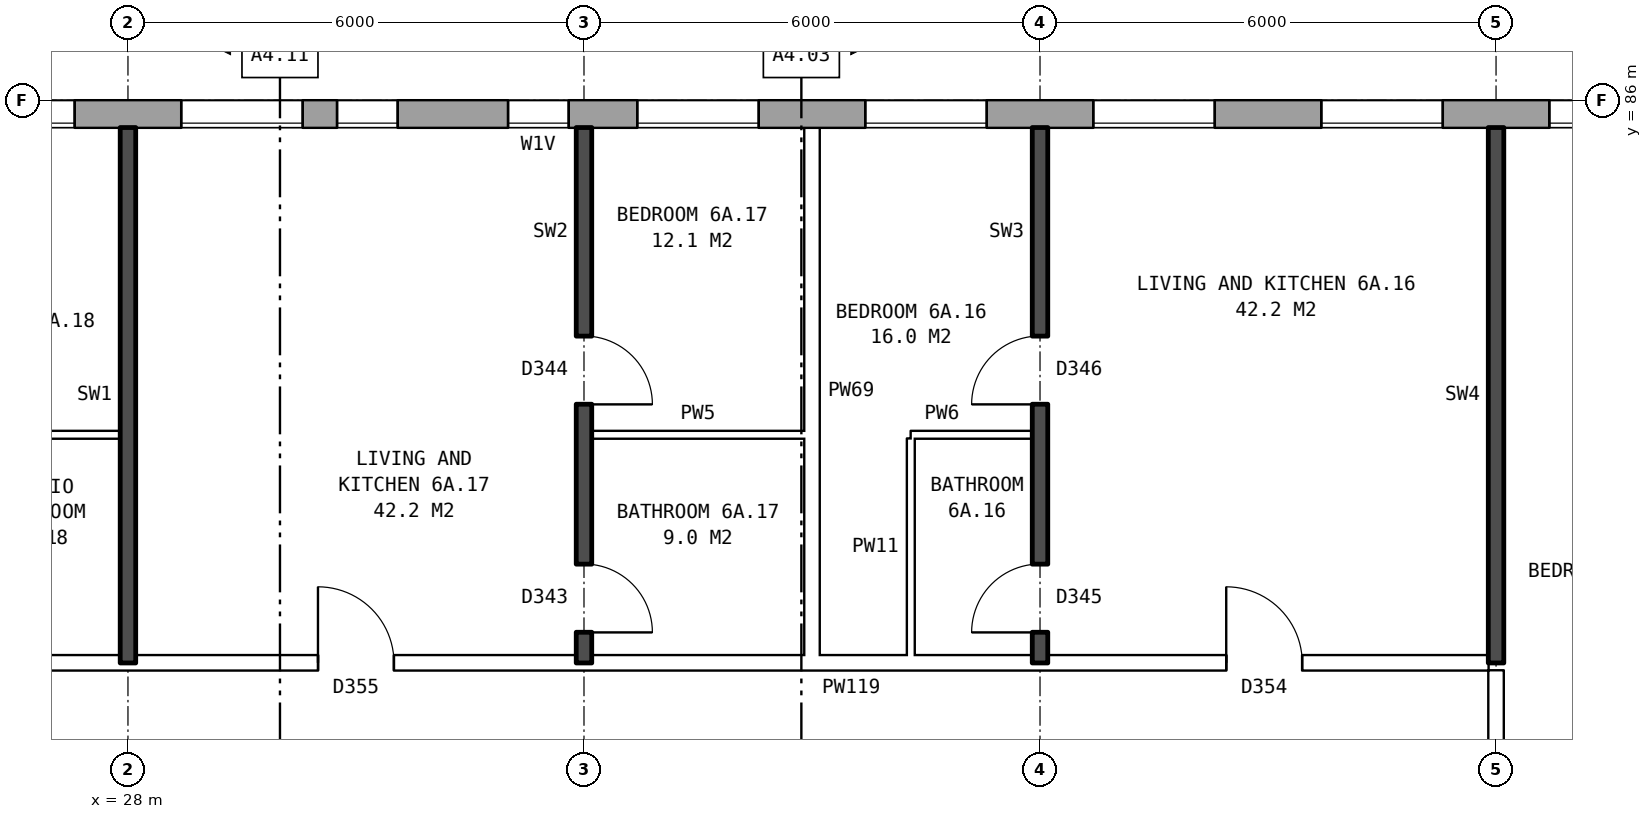
"""IFC4 building model, lengths in metres.
Left out: names, types, materials, properties, quantities, classifications, styles, units other than length and angle.
Written with IfcOpenShell. Run it as: python <this file> out.ifc"""

import sys

from ifc_helpers import new_model, si_unit, direction, frame, frame_2d, origin, place, context, subcontext, project, spatial, rectangle, extrude, element, fill, save


model = new_model("IFC4")
c1 = context("Model", 3, precision=1e-05, world=origin(), true_north=direction((0.0, 1.0)))
c2 = subcontext(c1, "Body", "Model", "MODEL_VIEW")
j1 = project(units=[si_unit("LENGTHUNIT", "METRE"), si_unit("PLANEANGLEUNIT", "RADIAN")], contexts=[c1])
p1 = place(None, origin())
s1 = spatial("IfcSite", under=j1, at=p1, CompositionType="ELEMENT")
p2 = place(p1, origin())
s2 = spatial("IfcBuilding", under=s1, at=p2, CompositionType="ELEMENT")
p3 = place(p2, frame((0.0, 0.0, 25.7)))
s3 = spatial("IfcBuildingStorey", under=s2, at=p3, CompositionType="ELEMENT", Elevation=25.7)
p4 = place(p3, frame((72.925, 85.82, 0.0), z_axis=(0.0, 0.0, 1.0), x_axis=(-1.0, 0.0, 0.0)))
e1 = element("IfcWall", 1, at=p4, inside=s3, PredefinedType="STANDARD", context=c2, shape_type="SweptSolid", body=[
    extrude(rectangle(XDim=50.101, YDim=0.36, at=frame_2d((25.05, 0.0))), origin(), (0.0, 0.0, 1.0), 2.85),
])
p5 = place(p4, frame((0.625, 0.0, 0.8)))
e2 = element("IfcOpeningElement", 2, at=p5, cuts=e1, PredefinedType="OPENING", context=c2, shape_type="SweptSolid", body=[
    extrude(rectangle(XDim=1.6, YDim=1.8, at=frame_2d((0.8, 0.9))), frame((0.0, 0.19, 0.0), z_axis=(0.0, -1.0, 0.0), x_axis=(1.0, 0.0, 0.0)), (0.0, 0.0, 1.0), 0.38),
])
p6 = place(p4, frame((3.625, 0.0, 0.8)))
e3 = element("IfcOpeningElement", 3, at=p6, cuts=e1, PredefinedType="OPENING", context=c2, shape_type="SweptSolid", body=[
    extrude(rectangle(XDim=1.6, YDim=1.8, at=frame_2d((0.8, 0.9))), frame((0.0, 0.19, 0.0), z_axis=(0.0, -1.0, 0.0), x_axis=(1.0, 0.0, 0.0)), (0.0, 0.0, 1.0), 0.38),
])
p7 = place(p4, frame((5.525, 0.0, 0.8)))
e4 = element("IfcOpeningElement", 4, at=p7, cuts=e1, PredefinedType="OPENING", context=c2, shape_type="SweptSolid", body=[
    extrude(rectangle(XDim=1.4, YDim=1.8, at=frame_2d((0.7, 0.9))), frame((0.0, 0.19, 0.0), z_axis=(0.0, -1.0, 0.0), x_axis=(1.0, 0.0, 0.0)), (0.0, 0.0, 1.0), 0.38),
])
p8 = place(p4, frame((9.175, 0.0, 0.15)))
e5 = element("IfcOpeningElement", 5, at=p8, cuts=e1, PredefinedType="OPENING", context=c2, shape_type="SweptSolid", body=[
    extrude(rectangle(XDim=1.0, YDim=0.9, at=frame_2d((0.5, 0.45))), frame((0.0, 0.19, 0.0), z_axis=(0.0, -1.0, 0.0), x_axis=(1.0, 0.0, 0.0)), (0.0, 0.0, 1.0), 0.38),
])
p9 = place(p4, frame((12.625, 0.0, 0.8)))
e6 = element("IfcOpeningElement", 6, at=p9, cuts=e1, PredefinedType="OPENING", context=c2, shape_type="SweptSolid", body=[
    extrude(rectangle(XDim=1.6, YDim=1.8, at=frame_2d((0.8, 0.9))), frame((0.0, 0.19, 0.0), z_axis=(0.0, -1.0, 0.0), x_axis=(1.0, 0.0, 0.0)), (0.0, 0.0, 1.0), 0.38),
])
p10 = place(p4, frame((15.625, 0.0, 0.8)))
e7 = element("IfcOpeningElement", 7, at=p10, cuts=e1, PredefinedType="OPENING", context=c2, shape_type="SweptSolid", body=[
    extrude(rectangle(XDim=1.6, YDim=1.8, at=frame_2d((0.8, 0.9))), frame((0.0, 0.19, 0.0), z_axis=(0.0, -1.0, 0.0), x_axis=(1.0, 0.0, 0.0)), (0.0, 0.0, 1.0), 0.38),
])
p11 = place(p4, frame((18.625, 0.0, 0.8)))
e8 = element("IfcOpeningElement", 8, at=p11, cuts=e1, PredefinedType="OPENING", context=c2, shape_type="SweptSolid", body=[
    extrude(rectangle(XDim=1.6, YDim=1.8, at=frame_2d((0.8, 0.9))), frame((0.0, 0.19, 0.0), z_axis=(0.0, -1.0, 0.0), x_axis=(1.0, 0.0, 0.0)), (0.0, 0.0, 1.0), 0.38),
])
p12 = place(p4, frame((21.625, 0.0, 0.8)))
e9 = element("IfcOpeningElement", 9, at=p12, cuts=e1, PredefinedType="OPENING", context=c2, shape_type="SweptSolid", body=[
    extrude(rectangle(XDim=1.6, YDim=1.8, at=frame_2d((0.8, 0.9))), frame((0.0, 0.19, 0.0), z_axis=(0.0, -1.0, 0.0), x_axis=(1.0, 0.0, 0.0)), (0.0, 0.0, 1.0), 0.38),
])
p13 = place(p4, frame((24.625, 0.0, 0.8)))
e10 = element("IfcOpeningElement", 10, at=p13, cuts=e1, PredefinedType="OPENING", context=c2, shape_type="SweptSolid", body=[
    extrude(rectangle(XDim=1.6, YDim=1.8, at=frame_2d((0.8, 0.9))), frame((0.0, 0.19, 0.0), z_axis=(0.0, -1.0, 0.0), x_axis=(1.0, 0.0, 0.0)), (0.0, 0.0, 1.0), 0.38),
])
p14 = place(p4, frame((27.625, 0.0, 0.8)))
e11 = element("IfcOpeningElement", 11, at=p14, cuts=e1, PredefinedType="OPENING", context=c2, shape_type="SweptSolid", body=[
    extrude(rectangle(XDim=1.6, YDim=1.8, at=frame_2d((0.8, 0.9))), frame((0.0, 0.19, 0.0), z_axis=(0.0, -1.0, 0.0), x_axis=(1.0, 0.0, 0.0)), (0.0, 0.0, 1.0), 0.38),
])
p15 = place(p4, frame((30.625, 0.0, 0.8)))
e12 = element("IfcOpeningElement", 12, at=p15, cuts=e1, PredefinedType="OPENING", context=c2, shape_type="SweptSolid", body=[
    extrude(rectangle(XDim=1.6, YDim=1.8, at=frame_2d((0.8, 0.9))), frame((0.0, 0.19, 0.0), z_axis=(0.0, -1.0, 0.0), x_axis=(1.0, 0.0, 0.0)), (0.0, 0.0, 1.0), 0.38),
])
p16 = place(p4, frame((33.625, 0.0, 0.8)))
e13 = element("IfcOpeningElement", 13, at=p16, cuts=e1, PredefinedType="OPENING", context=c2, shape_type="SweptSolid", body=[
    extrude(rectangle(XDim=1.6, YDim=1.8, at=frame_2d((0.8, 0.9))), frame((0.0, 0.19, 0.0), z_axis=(0.0, -1.0, 0.0), x_axis=(1.0, 0.0, 0.0)), (0.0, 0.0, 1.0), 0.38),
])
p17 = place(p4, frame((36.625, 0.0, 0.8)))
e14 = element("IfcOpeningElement", 14, at=p17, cuts=e1, PredefinedType="OPENING", context=c2, shape_type="SweptSolid", body=[
    extrude(rectangle(XDim=1.6, YDim=1.8, at=frame_2d((0.8, 0.9))), frame((0.0, 0.19, 0.0), z_axis=(0.0, -1.0, 0.0), x_axis=(1.0, 0.0, 0.0)), (0.0, 0.0, 1.0), 0.38),
])
p18 = place(p4, frame((39.125, 0.0, 0.8)))
e15 = element("IfcOpeningElement", 15, at=p18, cuts=e1, PredefinedType="OPENING", context=c2, shape_type="SweptSolid", body=[
    extrude(rectangle(XDim=0.8, YDim=0.9, at=frame_2d((0.4, 0.45))), frame((0.0, 0.19, 0.0), z_axis=(0.0, -1.0, 0.0), x_axis=(1.0, 0.0, 0.0)), (0.0, 0.0, 1.0), 0.38),
])
p19 = place(p4, frame((42.625, 0.0, 0.8)))
e16 = element("IfcOpeningElement", 16, at=p19, cuts=e1, PredefinedType="OPENING", context=c2, shape_type="SweptSolid", body=[
    extrude(rectangle(XDim=1.6, YDim=1.8, at=frame_2d((0.8, 0.9))), frame((0.0, 0.19, 0.0), z_axis=(0.0, -1.0, 0.0), x_axis=(1.0, 0.0, 0.0)), (0.0, 0.0, 1.0), 0.38),
])
p20 = place(p4, frame((45.625, 0.0, 0.8)))
e17 = element("IfcOpeningElement", 17, at=p20, cuts=e1, PredefinedType="OPENING", context=c2, shape_type="SweptSolid", body=[
    extrude(rectangle(XDim=1.6, YDim=1.8, at=frame_2d((0.8, 0.9))), frame((0.0, 0.19, 0.0), z_axis=(0.0, -1.0, 0.0), x_axis=(1.0, 0.0, 0.0)), (0.0, 0.0, 1.0), 0.38),
])
p21 = place(p4, frame((7.225, 0.0, 1.4)))
e18 = element("IfcOpeningElement", 18, at=p21, cuts=e1, PredefinedType="OPENING", context=c2, shape_type="SweptSolid", body=[
    extrude(rectangle(XDim=1.0, YDim=1.2, at=frame_2d((0.5, 0.6))), frame((0.0, 0.19, 0.0), z_axis=(0.0, -1.0, 0.0), x_axis=(1.0, 0.0, 0.0)), (0.0, 0.0, 1.0), 0.38),
])
p22 = place(p4, frame((10.525, 0.0, 0.15)))
e19 = element("IfcOpeningElement", 19, at=p22, cuts=e1, PredefinedType="OPENING", context=c2, shape_type="SweptSolid", body=[
    extrude(rectangle(XDim=1.2, YDim=1.8, at=frame_2d((0.6, 0.9))), frame((0.0, 0.19, 0.0), z_axis=(0.0, -1.0, 0.0), x_axis=(1.0, 0.0, 0.0)), (0.0, 0.0, 1.0), 0.38),
])
p23 = place(p4, frame((41.375, 0.0, 1.7)))
e20 = element("IfcOpeningElement", 20, at=p23, cuts=e1, PredefinedType="OPENING", context=c2, shape_type="SweptSolid", body=[
    extrude(rectangle(XDim=0.8, YDim=0.9, at=frame_2d((0.4, 0.45))), frame((0.0, 0.19, 0.0), z_axis=(0.0, -1.0, 0.0), x_axis=(1.0, 0.0, 0.0)), (0.0, 0.0, 1.0), 0.38),
])
p24 = place(p3, frame((20.11, 78.6, 0.0), z_axis=(0.0, 0.0, 1.0), x_axis=(1.0, 0.0, 0.0)))
e21 = element("IfcWall", 21, at=p24, inside=s3, PredefinedType="PARTITIONING", context=c2, shape_type="SweptSolid", body=[
    extrude(rectangle(XDim=25.79, YDim=0.2, at=frame_2d((12.895, 0.0))), origin(), (0.0, 0.0, 1.0), 2.85),
])
p25 = place(p24, frame((22.34, 0.0, 0.0)))
e22 = element("IfcOpeningElement", 22, at=p25, cuts=e21, PredefinedType="OPENING", context=c2, shape_type="SweptSolid", body=[
    extrude(rectangle(XDim=1.0, YDim=2.1, at=frame_2d((0.5, 1.05))), frame((0.0, 0.11, 0.0), z_axis=(0.0, -1.0, 0.0), x_axis=(1.0, 0.0, 0.0)), (0.0, 0.0, 1.0), 0.22),
])
p26 = place(p24, frame((10.39, 0.0, 0.0)))
e23 = element("IfcOpeningElement", 23, at=p26, cuts=e21, PredefinedType="OPENING", context=c2, shape_type="SweptSolid", body=[
    extrude(rectangle(XDim=1.0, YDim=2.1, at=frame_2d((0.5, 1.05))), frame((0.0, 0.11, 0.0), z_axis=(0.0, -1.0, 0.0), x_axis=(1.0, 0.0, 0.0)), (0.0, 0.0, 1.0), 0.22),
])
p27 = place(p24, frame((2.245, 0.0, 0.0)))
e24 = element("IfcOpeningElement", 24, at=p27, cuts=e21, PredefinedType="OPENING", context=c2, shape_type="SweptSolid", body=[
    extrude(rectangle(XDim=1.0, YDim=2.1, at=frame_2d((0.5, 1.05))), frame((0.0, 0.11, 0.0), z_axis=(0.0, -1.0, 0.0), x_axis=(1.0, 0.0, 0.0)), (0.0, 0.0, 1.0), 0.22),
])
p28 = place(p3, frame((25.6, 81.6, 0.0), z_axis=(0.0, 0.0, 1.0), x_axis=(1.0, 0.0, 0.0)))
e25 = element("IfcWall", 25, at=p28, inside=s3, PredefinedType="PARTITIONING", context=c2, shape_type="SweptSolid", body=[
    extrude(rectangle(XDim=2.3, YDim=0.1, at=frame_2d((1.15, 0.0))), origin(), (0.0, 0.0, 1.0), 2.85),
])
p29 = place(p3, frame((34.1, 81.6, 0.0), z_axis=(0.0, 0.0, 1.0), x_axis=(1.0, 0.0, 0.0)))
e26 = element("IfcWall", 26, at=p29, inside=s3, PredefinedType="PARTITIONING", context=c2, shape_type="SweptSolid", body=[
    extrude(rectangle(XDim=2.8, YDim=0.1, at=frame_2d((1.4, 0.0))), origin(), (0.0, 0.0, 1.0), 2.85),
])
p30 = place(p3, frame((38.3, 81.6, 0.0), z_axis=(0.0, 0.0, 1.0), x_axis=(1.0, 0.0, 0.0)))
e27 = element("IfcWall", 27, at=p30, inside=s3, PredefinedType="PARTITIONING", context=c2, shape_type="SweptSolid", body=[
    extrude(rectangle(XDim=1.6, YDim=0.1, at=frame_2d((0.8, 0.0))), origin(), (0.0, 0.0, 1.0), 2.85),
])
p31 = place(p3, frame((28.0, 78.6, 0.0), z_axis=(0.0, 0.0, 1.0), x_axis=(0.0, 1.0, 0.0)))
e28 = element("IfcWall", 28, at=p31, inside=s3, PredefinedType="SOLIDWALL", context=c2, shape_type="SweptSolid", body=[
    extrude(rectangle(XDim=7.04, YDim=0.2, at=frame_2d((3.52, 0.0))), origin(), (0.0, 0.0, 1.0), 2.85),
])
p32 = place(p3, frame((34.0, 78.6, 0.0), z_axis=(0.0, 0.0, 1.0), x_axis=(0.0, 1.0, 0.0)))
e29 = element("IfcWall", 29, at=p32, inside=s3, PredefinedType="SOLIDWALL", context=c2, shape_type="SweptSolid", body=[
    extrude(rectangle(XDim=7.04, YDim=0.2, at=frame_2d((3.52, 0.0))), origin(), (0.0, 0.0, 1.0), 2.85),
])
p33 = place(p32, frame((3.4, 0.0, 0.0)))
e30 = element("IfcOpeningElement", 30, at=p33, cuts=e29, PredefinedType="OPENING", context=c2, shape_type="SweptSolid", body=[
    extrude(rectangle(XDim=0.9, YDim=2.1, at=frame_2d((0.45, 1.05))), frame((0.0, 0.11, 0.0), z_axis=(0.0, -1.0, 0.0), x_axis=(1.0, 0.0, 0.0)), (0.0, 0.0, 1.0), 0.22),
])
p34 = place(p32, frame((0.4, 0.0, 0.0)))
e31 = element("IfcOpeningElement", 31, at=p34, cuts=e29, PredefinedType="OPENING", context=c2, shape_type="SweptSolid", body=[
    extrude(rectangle(XDim=0.9, YDim=2.1, at=frame_2d((0.45, 1.05))), frame((0.0, 0.11, 0.0), z_axis=(0.0, -1.0, 0.0), x_axis=(1.0, 0.0, 0.0)), (0.0, 0.0, 1.0), 0.22),
])
p35 = place(p3, frame((37.0, 78.7, 0.0), z_axis=(0.0, 0.0, 1.0), x_axis=(0.0, 1.0, 0.0)))
e32 = element("IfcWall", 32, at=p35, inside=s3, PredefinedType="PARTITIONING", context=c2, shape_type="SweptSolid", body=[
    extrude(rectangle(XDim=6.94, YDim=0.2, at=frame_2d((3.47, 0.0))), origin(), (0.0, 0.0, 1.0), 2.85),
])
p36 = place(p3, frame((38.3, 78.7, 0.0), z_axis=(0.0, 0.0, 1.0), x_axis=(0.0, 1.0, 0.0)))
e33 = element("IfcWall", 33, at=p36, inside=s3, PredefinedType="PARTITIONING", context=c2, shape_type="SweptSolid", body=[
    extrude(rectangle(XDim=2.85, YDim=0.1, at=frame_2d((1.425, 0.0))), origin(), (0.0, 0.0, 1.0), 2.85),
])
p37 = place(p3, frame((40.0, 78.6, 0.0), z_axis=(0.0, 0.0, 1.0), x_axis=(0.0, 1.0, 0.0)))
e34 = element("IfcWall", 34, at=p37, inside=s3, PredefinedType="SOLIDWALL", context=c2, shape_type="SweptSolid", body=[
    extrude(rectangle(XDim=7.04, YDim=0.2, at=frame_2d((3.52, 0.0))), origin(), (0.0, 0.0, 1.0), 2.85),
])
p38 = place(p37, frame((3.4, 0.0, 0.0)))
e35 = element("IfcOpeningElement", 35, at=p38, cuts=e34, PredefinedType="OPENING", context=c2, shape_type="SweptSolid", body=[
    extrude(rectangle(XDim=0.9, YDim=2.1, at=frame_2d((0.45, 1.05))), frame((0.0, 0.11, 0.0), z_axis=(0.0, -1.0, 0.0), x_axis=(1.0, 0.0, 0.0)), (0.0, 0.0, 1.0), 0.22),
])
p39 = place(p37, frame((0.4, 0.0, 0.0)))
e36 = element("IfcOpeningElement", 36, at=p39, cuts=e34, PredefinedType="OPENING", context=c2, shape_type="SweptSolid", body=[
    extrude(rectangle(XDim=0.9, YDim=2.1, at=frame_2d((0.45, 1.05))), frame((0.0, 0.11, 0.0), z_axis=(0.0, -1.0, 0.0), x_axis=(1.0, 0.0, 0.0)), (0.0, 0.0, 1.0), 0.22),
])
p40 = place(p3, frame((46.0, 76.3, 0.0), z_axis=(0.0, 0.0, 1.0), x_axis=(0.0, 1.0, 0.0)))
e37 = element("IfcWall", 37, at=p40, inside=s3, PredefinedType="PARTITIONING", context=c2, shape_type="SweptSolid", body=[
    extrude(rectangle(XDim=2.2, YDim=0.2, at=frame_2d((1.1, 0.0))), origin(), (0.0, 0.0, 1.0), 2.85),
])
p41 = place(p3, frame((46.0, 78.6, 0.0), z_axis=(0.0, 0.0, 1.0), x_axis=(0.0, 1.0, 0.0)))
e38 = element("IfcWall", 38, at=p41, inside=s3, PredefinedType="SOLIDWALL", context=c2, shape_type="SweptSolid", body=[
    extrude(rectangle(XDim=7.04, YDim=0.2, at=frame_2d((3.52, 0.0))), origin(), (0.0, 0.0, 1.0), 2.85),
])
p42 = place(p13, origin())
e39 = element("IfcWindow", 39, at=p42, inside=s3, PartitioningType="SINGLE_PANEL", PredefinedType="WINDOW", context=c2, shape_type="SweptSolid", body=[
    extrude(rectangle(XDim=1.6, YDim=1.8, at=frame_2d((0.8, 0.9))), frame((0.0, 0.15, 0.0), z_axis=(0.0, -1.0, 0.0), x_axis=(1.0, 0.0, 0.0)), (0.0, 0.0, 1.0), 0.06),
])
fill(e10, e39)
p43 = place(p14, origin())
e40 = element("IfcWindow", 40, at=p43, inside=s3, PartitioningType="SINGLE_PANEL", PredefinedType="WINDOW", context=c2, shape_type="SweptSolid", body=[
    extrude(rectangle(XDim=1.6, YDim=1.8, at=frame_2d((0.8, 0.9))), frame((0.0, 0.15, 0.0), z_axis=(0.0, -1.0, 0.0), x_axis=(1.0, 0.0, 0.0)), (0.0, 0.0, 1.0), 0.06),
])
fill(e11, e40)
p44 = place(p15, origin())
e41 = element("IfcWindow", 41, at=p44, inside=s3, PartitioningType="SINGLE_PANEL", PredefinedType="WINDOW", context=c2, shape_type="SweptSolid", body=[
    extrude(rectangle(XDim=1.6, YDim=1.8, at=frame_2d((0.8, 0.9))), frame((0.0, 0.15, 0.0), z_axis=(0.0, -1.0, 0.0), x_axis=(1.0, 0.0, 0.0)), (0.0, 0.0, 1.0), 0.06),
])
fill(e12, e41)
p45 = place(p16, origin())
e42 = element("IfcWindow", 42, at=p45, inside=s3, PartitioningType="SINGLE_PANEL", PredefinedType="WINDOW", context=c2, shape_type="SweptSolid", body=[
    extrude(rectangle(XDim=1.6, YDim=1.8, at=frame_2d((0.8, 0.9))), frame((0.0, 0.15, 0.0), z_axis=(0.0, -1.0, 0.0), x_axis=(1.0, 0.0, 0.0)), (0.0, 0.0, 1.0), 0.06),
])
fill(e13, e42)
p46 = place(p17, origin())
e43 = element("IfcWindow", 43, at=p46, inside=s3, PartitioningType="SINGLE_PANEL", PredefinedType="WINDOW", context=c2, shape_type="SweptSolid", body=[
    extrude(rectangle(XDim=1.6, YDim=1.8, at=frame_2d((0.8, 0.9))), frame((0.0, 0.15, 0.0), z_axis=(0.0, -1.0, 0.0), x_axis=(1.0, 0.0, 0.0)), (0.0, 0.0, 1.0), 0.06),
])
fill(e14, e43)
p47 = place(p18, origin())
e44 = element("IfcWindow", 44, at=p47, inside=s3, PartitioningType="SINGLE_PANEL", PredefinedType="WINDOW", context=c2, shape_type="SweptSolid", body=[
    extrude(rectangle(XDim=0.8, YDim=0.9, at=frame_2d((0.4, 0.45))), frame((0.0, 0.15, 0.0), z_axis=(0.0, -1.0, 0.0), x_axis=(1.0, 0.0, 0.0)), (0.0, 0.0, 1.0), 0.06),
])
fill(e15, e44)
p48 = place(p19, origin())
e45 = element("IfcWindow", 45, at=p48, inside=s3, PartitioningType="SINGLE_PANEL", PredefinedType="WINDOW", context=c2, shape_type="SweptSolid", body=[
    extrude(rectangle(XDim=1.6, YDim=1.8, at=frame_2d((0.8, 0.9))), frame((0.0, 0.15, 0.0), z_axis=(0.0, -1.0, 0.0), x_axis=(1.0, 0.0, 0.0)), (0.0, 0.0, 1.0), 0.06),
])
fill(e16, e45)
p49 = place(p20, origin())
e46 = element("IfcWindow", 46, at=p49, inside=s3, PartitioningType="SINGLE_PANEL", PredefinedType="WINDOW", context=c2, shape_type="SweptSolid", body=[
    extrude(rectangle(XDim=1.6, YDim=1.8, at=frame_2d((0.8, 0.9))), frame((0.0, 0.15, 0.0), z_axis=(0.0, -1.0, 0.0), x_axis=(1.0, 0.0, 0.0)), (0.0, 0.0, 1.0), 0.06),
])
fill(e17, e46)
p50 = place(p38, origin())
e47 = element("IfcDoor", 47, at=p50, inside=s3, OperationType="SINGLE_SWING_LEFT", PredefinedType="DOOR", context=c2, shape_type="SweptSolid", body=[
    extrude(rectangle(XDim=0.9, YDim=2.1, at=frame_2d((0.45, 1.05))), frame((0.0, 0.025, 0.0), z_axis=(0.0, -1.0, 0.0), x_axis=(1.0, 0.0, 0.0)), (0.0, 0.0, 1.0), 0.05),
])
fill(e35, e47)
p51 = place(p25, origin())
e48 = element("IfcDoor", 48, at=p51, inside=s3, OperationType="SINGLE_SWING_LEFT", PredefinedType="DOOR", context=c2, shape_type="SweptSolid", body=[
    extrude(rectangle(XDim=1.0, YDim=2.1, at=frame_2d((0.5, 1.05))), frame((0.0, 0.025, 0.0), z_axis=(0.0, -1.0, 0.0), x_axis=(1.0, 0.0, 0.0)), (0.0, 0.0, 1.0), 0.05),
])
fill(e22, e48)
p52 = place(p39, origin())
e49 = element("IfcDoor", 49, at=p52, inside=s3, OperationType="SINGLE_SWING_LEFT", PredefinedType="DOOR", context=c2, shape_type="SweptSolid", body=[
    extrude(rectangle(XDim=0.9, YDim=2.1, at=frame_2d((0.45, 1.05))), frame((0.0, 0.025, 0.0), z_axis=(0.0, -1.0, 0.0), x_axis=(1.0, 0.0, 0.0)), (0.0, 0.0, 1.0), 0.05),
])
fill(e36, e49)
p53 = place(p33, frame((0.9, 0.0, 0.0), z_axis=(0.0, 0.0, 1.0), x_axis=(-1.0, 0.0, 0.0)))
e50 = element("IfcDoor", 50, at=p53, inside=s3, OperationType="SINGLE_SWING_RIGHT", PredefinedType="DOOR", context=c2, shape_type="SweptSolid", body=[
    extrude(rectangle(XDim=0.9, YDim=2.1, at=frame_2d((0.45, 1.05))), frame((0.0, 0.025, 0.0), z_axis=(0.0, -1.0, 0.0), x_axis=(1.0, 0.0, 0.0)), (0.0, 0.0, 1.0), 0.05),
])
fill(e30, e50)
p54 = place(p26, origin())
e51 = element("IfcDoor", 51, at=p54, inside=s3, OperationType="SINGLE_SWING_LEFT", PredefinedType="DOOR", context=c2, shape_type="SweptSolid", body=[
    extrude(rectangle(XDim=1.0, YDim=2.1, at=frame_2d((0.5, 1.05))), frame((0.0, 0.025, 0.0), z_axis=(0.0, -1.0, 0.0), x_axis=(1.0, 0.0, 0.0)), (0.0, 0.0, 1.0), 0.05),
])
fill(e23, e51)
p55 = place(p34, frame((0.9, 0.0, 0.0), z_axis=(0.0, 0.0, 1.0), x_axis=(-1.0, 0.0, 0.0)))
e52 = element("IfcDoor", 52, at=p55, inside=s3, OperationType="SINGLE_SWING_RIGHT", PredefinedType="DOOR", context=c2, shape_type="SweptSolid", body=[
    extrude(rectangle(XDim=0.9, YDim=2.1, at=frame_2d((0.45, 1.05))), frame((0.0, 0.025, 0.0), z_axis=(0.0, -1.0, 0.0), x_axis=(1.0, 0.0, 0.0)), (0.0, 0.0, 1.0), 0.05),
])
fill(e31, e52)
p56 = place(p23, origin())
e53 = element("IfcWindow", 53, at=p56, inside=s3, PartitioningType="SINGLE_PANEL", PredefinedType="WINDOW", context=c2, shape_type="SweptSolid", body=[
    extrude(rectangle(XDim=0.8, YDim=0.9, at=frame_2d((0.4, 0.45))), frame((0.0, 0.15, 0.0), z_axis=(0.0, -1.0, 0.0), x_axis=(1.0, 0.0, 0.0)), (0.0, 0.0, 1.0), 0.06),
])
fill(e20, e53)
save(model, sys.argv[1])
